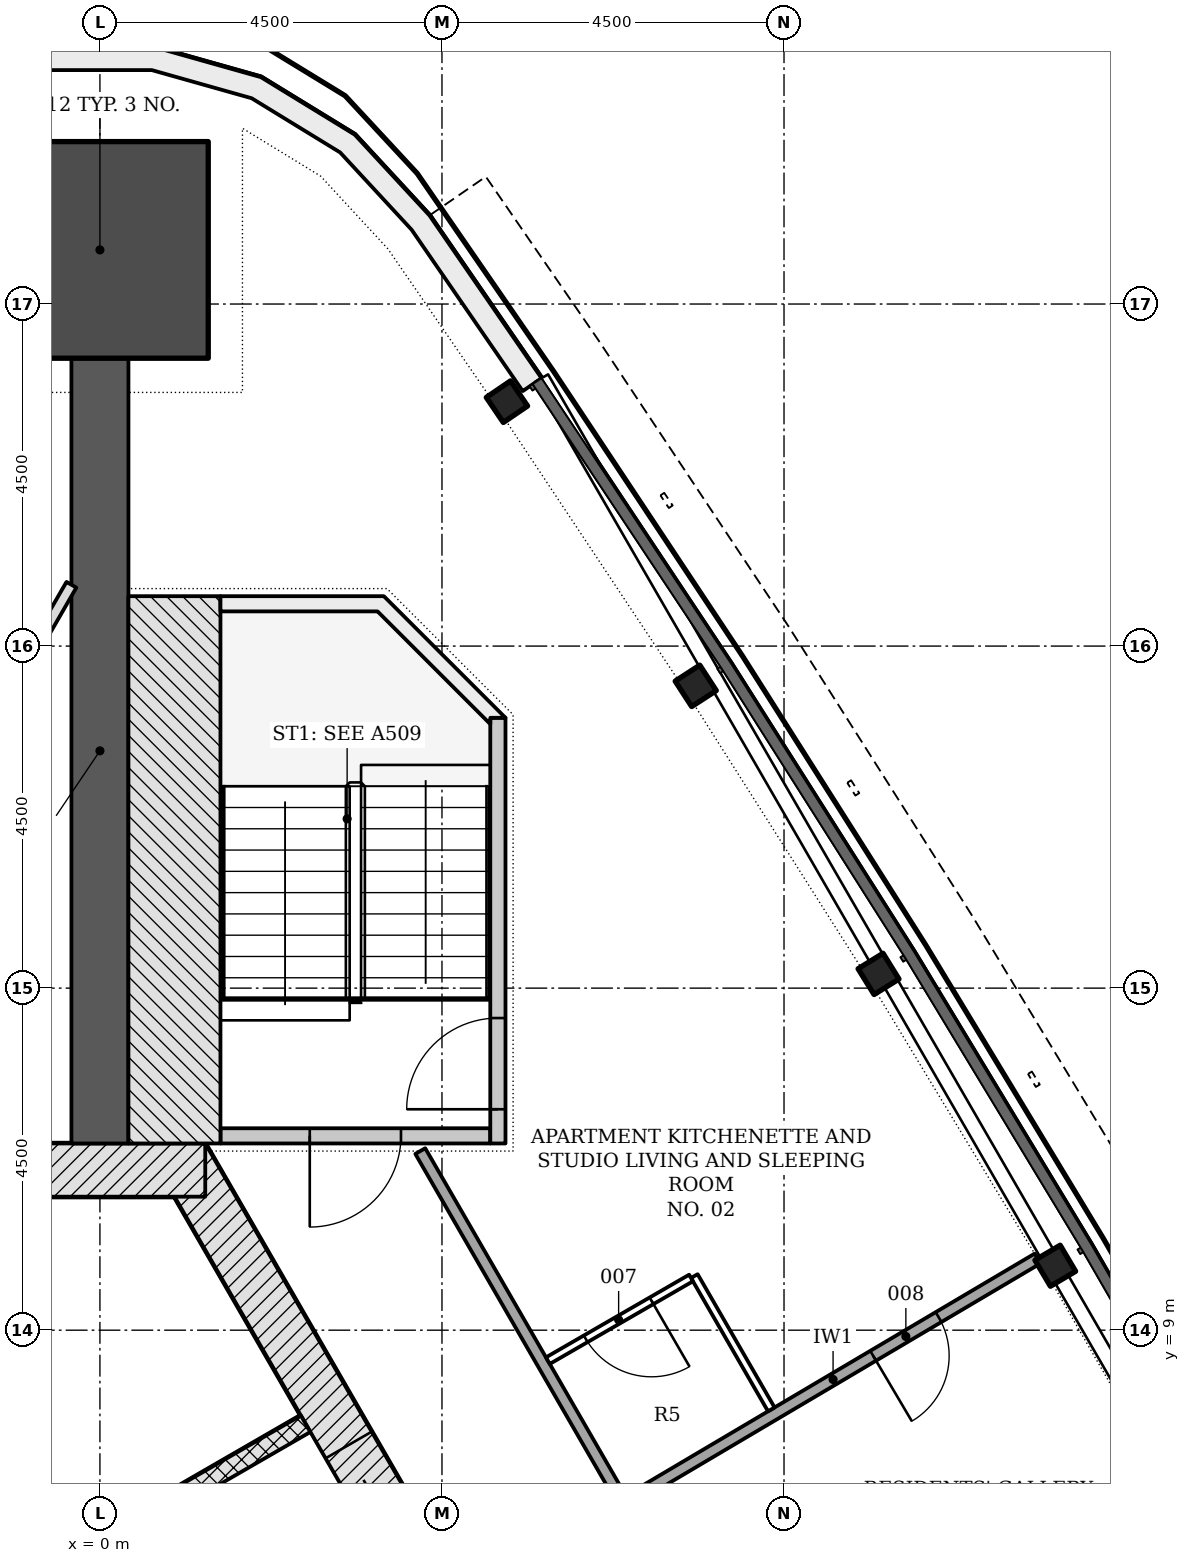
"""IFC4 building model, lengths in metres.
Left out: names, types, materials, properties, quantities, classifications, styles, units other than length and angle.
Written with IfcOpenShell. Run it as: python <this file> out.ifc"""

import sys

from ifc_helpers import new_model, si_unit, direction, frame, frame_2d, origin, origin_2d, place, context, subcontext, project, spatial, polyline, rectangle, i_section, outline, extrude, element, fill, save


model = new_model("IFC4")
c1 = context("Model", 3, precision=1e-05, world=origin(), true_north=direction((0.0, 1.0)))
c2 = subcontext(c1, "Body", "Model", "MODEL_VIEW")
j1 = project(units=[si_unit("LENGTHUNIT", "METRE"), si_unit("PLANEANGLEUNIT", "RADIAN")], contexts=[c1])
p1 = place(None, origin())
s1 = spatial("IfcSite", under=j1, at=p1, CompositionType="ELEMENT")
p2 = place(p1, origin())
s2 = spatial("IfcBuilding", under=s1, at=p2, CompositionType="ELEMENT")
p3 = place(p2, frame((0.0, 0.0, 158.1)))
s3 = spatial("IfcBuildingStorey", under=s2, at=p3, CompositionType="ELEMENT", Elevation=158.1)
p4 = place(p3, frame((10.311, -4.703, -0.2), z_axis=(0.0, 0.0, 1.0), x_axis=(-0.500001446645, 0.866024568562, 0.0)))
e1 = element("IfcWall", 1, at=p4, inside=s3, PredefinedType="SHEAR", context=c2, shape_type="SweptSolid", body=[
    extrude(rectangle(XDim=18.458, YDim=0.7, at=frame_2d((9.229, 0.0))), origin(), (0.0, 0.0, 1.0), 3.6),
])
p5 = place(p4, frame((4.379, 0.0, 0.2)))
e2 = element("IfcOpeningElement", 2, at=p5, cuts=e1, PredefinedType="OPENING", context=c2, shape_type="SweptSolid", body=[
    extrude(rectangle(XDim=1.1, YDim=2.1, at=frame_2d((0.55, 1.05))), frame((0.0, 0.36, 0.0), z_axis=(0.0, -1.0, 0.0), x_axis=(1.0, 0.0, 0.0)), (0.0, 0.0, 1.0), 0.72),
])
p6 = place(p4, frame((6.529, 0.0, 0.2)))
e3 = element("IfcOpeningElement", 3, at=p6, cuts=e1, PredefinedType="OPENING", context=c2, shape_type="SweptSolid", body=[
    extrude(rectangle(XDim=1.1, YDim=2.1, at=frame_2d((0.55, 1.05))), frame((0.0, 0.36, 0.0), z_axis=(0.0, -1.0, 0.0), x_axis=(1.0, 0.0, 0.0)), (0.0, 0.0, 1.0), 0.72),
])
p7 = place(p4, frame((8.679, 0.0, 0.2)))
e4 = element("IfcOpeningElement", 4, at=p7, cuts=e1, PredefinedType="OPENING", context=c2, shape_type="SweptSolid", body=[
    extrude(rectangle(XDim=1.1, YDim=2.1, at=frame_2d((0.55, 1.05))), frame((0.0, 0.36, 0.0), z_axis=(0.0, -1.0, 0.0), x_axis=(1.0, 0.0, 0.0)), (0.0, 0.0, 1.0), 0.72),
])
p8 = place(p4, frame((10.829, 0.0, 0.2)))
e5 = element("IfcOpeningElement", 5, at=p8, cuts=e1, PredefinedType="OPENING", context=c2, shape_type="SweptSolid", body=[
    extrude(rectangle(XDim=1.1, YDim=2.1, at=frame_2d((0.55, 1.05))), frame((0.0, 0.36, 0.0), z_axis=(0.0, -1.0, 0.0), x_axis=(1.0, 0.0, 0.0)), (0.0, 0.0, 1.0), 0.72),
])
p9 = place(p4, frame((12.979, 0.0, 0.2)))
e6 = element("IfcOpeningElement", 6, at=p9, cuts=e1, PredefinedType="OPENING", context=c2, shape_type="SweptSolid", body=[
    extrude(rectangle(XDim=1.1, YDim=2.1, at=frame_2d((0.55, 1.05))), frame((0.0, 0.36, 0.0), z_axis=(0.0, -1.0, 0.0), x_axis=(1.0, 0.0, 0.0)), (0.0, 0.0, 1.0), 0.72),
])
p10 = place(p3, frame((1.386, 11.106, -0.2), z_axis=(0.0, 0.0, 1.0), x_axis=(-1.0, 0.0, 0.0)))
e7 = element("IfcWall", 7, at=p10, inside=s3, PredefinedType="SHEAR", context=c2, shape_type="SweptSolid", body=[
    extrude(rectangle(XDim=2.771, YDim=0.7, at=frame_2d((1.386, 0.0))), origin(), (0.0, 0.0, 1.0), 3.6),
])
p11 = place(p3, frame((0.0, 11.456, -0.2), z_axis=(0.0, 0.0, 1.0), x_axis=(0.0, 1.0, 0.0)))
e8 = element("IfcWall", 8, at=p11, inside=s3, PredefinedType="SHEAR", context=c2, shape_type="SweptSolid", body=[
    extrude(rectangle(XDim=10.331, YDim=0.75, at=frame_2d((5.166, 0.0))), origin(), (0.0, 0.0, 1.0), 3.6),
])
p12 = place(p3, frame((0.0, 23.212, -0.2), z_axis=(0.0, 0.0, 1.0), x_axis=(0.0, 1.0, 0.0)))
e9 = element("IfcColumn", 9, at=p12, inside=s3, PredefinedType="COLUMN", context=c2, shape_type="SweptSolid", body=[
    extrude(rectangle(XDim=2.85, YDim=2.85, at=origin_2d()), origin(), (0.0, 0.0, 1.0), 3.6),
])
for number, where, z_axis, x_axis in (
    (10, (12.569, 9.848, -0.2), (0.0, 0.0, 1.0), (-0.509, 0.861, 0.0)),
    (11, (10.244, 13.687, -0.2), (0.0, 0.0, 1.0), (-0.527, 0.85, 0.0)),
    (12, (7.839, 17.477, -0.2), (0.0, 0.0, 1.0), (-0.545, 0.839, 0.0)),
    (13, (5.355, 21.215, -0.2), (0.0, 0.0, 1.0), (-0.562, 0.827, 0.0)),
):
    element("IfcColumn", number, at=place(p3, frame(where, z_axis=z_axis, x_axis=x_axis)), inside=s3, PredefinedType="COLUMN", context=c2, shape_type="SweptSolid", body=[
        extrude(i_section(OverallWidth=0.399, OverallDepth=0.386, WebThickness=0.021, FlangeThickness=0.033, FilletRadius=0.015, at=origin_2d()), origin(), (0.0, 0.0, 1.0), 3.6),
    ])
p13 = place(p3, origin())
e14 = element("IfcWall", 14, at=p13, inside=s3, PredefinedType="NOTDEFINED", context=c2, shape_type="SweptSolid", body=[
    extrude(outline(polyline([(5.81, 21.524), (4.336, 23.665), (3.353, 24.728), (2.118, 25.485), (0.724, 25.877), (-0.724, 25.877), (-2.118, 25.485), (-3.353, 24.728), (-4.336, 23.665), (-5.81, 21.524), (-5.562, 21.354), (-4.101, 23.477), (-3.16, 24.494), (-1.996, 25.207), (-0.683, 25.578), (0.683, 25.578), (1.996, 25.207), (3.16, 24.494), (4.101, 23.477), (5.562, 21.354), (5.81, 21.524)])), origin(), (0.0, 0.0, 1.0), 3.3),
])
p14 = place(p3, frame((2.706, 7.769, -0.2), z_axis=(0.0, 0.0, 1.0), x_axis=(-0.866022959057, -0.500004234368, 0.0)))
e15 = element("IfcWall", 15, at=p14, inside=s3, PredefinedType="PARTITIONING", context=c2, shape_type="SweptSolid", body=[
    extrude(rectangle(XDim=2.5, YDim=0.25, at=frame_2d((1.25, 0.0))), origin(), (0.0, 0.0, 1.0), 3.6),
])
p15 = place(p3, frame((5.135, 11.556, -0.2), z_axis=(0.0, 0.0, 1.0), x_axis=(-1.0, 0.0, 0.0)))
e16 = element("IfcWall", 16, at=p15, inside=s3, PredefinedType="SHEAR", context=c2, shape_type="SweptSolid", body=[
    extrude(rectangle(XDim=3.55, YDim=0.2, at=frame_2d((1.775, 0.0))), origin(), (0.0, 0.0, 1.0), 3.6),
])
p16 = place(p15, frame((1.175, 0.0, 0.2)))
e17 = element("IfcOpeningElement", 17, at=p16, cuts=e16, PredefinedType="OPENING", context=c2, shape_type="SweptSolid", body=[
    extrude(rectangle(XDim=1.2, YDim=2.1, at=frame_2d((0.6, 1.05))), frame((0.0, 0.11, 0.0), z_axis=(0.0, -1.0, 0.0), x_axis=(1.0, 0.0, 0.0)), (0.0, 0.0, 1.0), 0.22),
])
p17 = place(p3, frame((5.236, 11.456, -0.2), z_axis=(0.0, 0.0, 1.0), x_axis=(0.0, 1.0, 0.0)))
e18 = element("IfcWall", 18, at=p17, inside=s3, PredefinedType="SHEAR", context=c2, shape_type="SweptSolid", body=[
    extrude(rectangle(XDim=5.6, YDim=0.2, at=frame_2d((2.8, 0.0))), origin(), (0.0, 0.0, 1.0), 3.6),
])
p18 = place(p17, frame((0.45, 0.0, 0.2)))
e19 = element("IfcOpeningElement", 19, at=p18, cuts=e18, PredefinedType="OPENING", context=c2, shape_type="SweptSolid", body=[
    extrude(rectangle(XDim=1.2, YDim=2.1, at=frame_2d((0.6, 1.05))), frame((0.0, 0.11, 0.0), z_axis=(0.0, -1.0, 0.0), x_axis=(1.0, 0.0, 0.0)), (0.0, 0.0, 1.0), 0.22),
])
p19 = place(p3, frame((0.98, 11.456, -0.2), z_axis=(0.0, 0.0, 1.0), x_axis=(0.0, 1.0, 0.0)))
e20 = element("IfcWall", 20, at=p19, inside=s3, PredefinedType="SHEAR", context=c2, shape_type="SweptSolid", body=[
    extrude(rectangle(XDim=7.2, YDim=1.211, at=frame_2d((3.6, 0.0))), origin(), (0.0, 0.0, 1.0), 3.6),
])
p20 = place(p3, frame((0.0, 0.0, -0.2)))
e21 = element("IfcWall", 21, at=p20, inside=s3, PredefinedType="SHEAR", context=c2, shape_type="SweptSolid", body=[
    extrude(outline(polyline([(5.336, 17.056), (3.736, 18.656), (1.586, 18.656), (1.586, 18.456), (3.653, 18.456), (5.135, 16.974), (5.135, 17.056), (5.135, 17.056), (5.135, 17.056), (5.135, 17.056), (5.135, 17.056), (5.135, 17.056), (5.135, 17.056), (5.135, 17.056), (5.135, 17.056), (5.135, 17.056), (5.135, 17.056), (5.135, 17.056), (5.135, 17.056), (5.135, 17.056), (5.135, 17.056), (5.135, 17.056), (5.135, 17.056), (5.336, 17.056)])), origin(), (0.0, 0.0, 1.0), 3.6),
])
p21 = place(p3, frame((6.89, 6.722, 0.0), z_axis=(0.0, 0.0, 1.0), x_axis=(-0.500025224267, 0.866010840057, 0.0)))
e22 = element("IfcWall", 22, at=p21, inside=s3, PredefinedType="PARTITIONING", context=c2, shape_type="SweptSolid", body=[
    extrude(rectangle(XDim=5.351, YDim=0.15, at=frame_2d((2.676, 0.0))), origin(), (0.0, 0.0, 1.0), 2.847),
])
p22 = place(p3, frame((12.336, 9.943, 0.0), z_axis=(0.0, 0.0, 1.0), x_axis=(-0.860742216303, -0.509041095663, 0.0)))
e23 = element("IfcWall", 23, at=p22, inside=s3, PredefinedType="PARTITIONING", context=c2, shape_type="SweptSolid", body=[
    extrude(rectangle(XDim=6.252, YDim=0.15, at=frame_2d((3.126, 0.0))), origin(), (0.0, 0.0, 1.0), 3.4),
])
p23 = place(p22, frame((1.513, 0.0, 0.0)))
e24 = element("IfcOpeningElement", 24, at=p23, cuts=e23, PredefinedType="OPENING", context=c2, shape_type="SweptSolid", body=[
    extrude(rectangle(XDim=1.0, YDim=2.1, at=frame_2d((0.5, 1.05))), frame((0.0, 0.085, 0.0), z_axis=(0.0, -1.0, 0.0), x_axis=(1.0, 0.0, 0.0)), (0.0, 0.0, 1.0), 0.17),
])
p24 = place(p3, frame((8.833, 7.958, 0.0), z_axis=(0.0, 0.0, 1.0), x_axis=(-0.499938124251, 0.866061124818, 0.0)))
e25 = element("IfcWall", 25, at=p24, inside=s3, PredefinedType="PARTITIONING", context=c2, shape_type="SweptSolid", body=[
    extrude(rectangle(XDim=2.025, YDim=0.1, at=frame_2d((1.013, 0.0))), origin(), (0.0, 0.0, 1.0), 3.4),
])
p25 = place(p3, frame((7.777, 9.687, 0.0), z_axis=(0.0, 0.0, 1.0), x_axis=(-0.866037911478, -0.499978335414, 0.0)))
e26 = element("IfcWall", 26, at=p25, inside=s3, PredefinedType="PARTITIONING", context=c2, shape_type="SweptSolid", body=[
    extrude(rectangle(XDim=2.175, YDim=0.1, at=frame_2d((1.087, 0.0))), origin(), (0.0, 0.0, 1.0), 3.4),
])
p26 = place(p25, frame((0.6, 0.0, 0.0)))
e27 = element("IfcOpeningElement", 27, at=p26, cuts=e26, PredefinedType="OPENING", context=c2, shape_type="SweptSolid", body=[
    extrude(rectangle(XDim=1.0, YDim=2.1, at=frame_2d((0.5, 1.05))), frame((0.0, 0.06, 0.0), z_axis=(0.0, -1.0, 0.0), x_axis=(1.0, 0.0, 0.0)), (0.0, 0.0, 1.0), 0.12),
])
p27 = place(p3, frame((-0.375, 18.807, 0.0), z_axis=(0.0, 0.0, 1.0), x_axis=(-0.499989180974, -0.866031650062, 0.0)))
e28 = element("IfcWall", 28, at=p27, inside=s3, PredefinedType="PARTITIONING", context=c2, shape_type="SweptSolid", body=[
    extrude(rectangle(XDim=5.388, YDim=0.15, at=frame_2d((2.694, 0.0))), origin(), (0.0, 0.0, 1.0), 2.847),
])
p28 = place(p9, origin())
e29 = element("IfcDoor", 29, at=p28, inside=s3, OperationType="DOUBLE_DOOR_SLIDING", PredefinedType="DOOR", context=c2, shape_type="SweptSolid", body=[
    extrude(rectangle(XDim=1.1, YDim=2.1, at=frame_2d((0.55, 1.05))), frame((0.0, 0.025, 0.0), z_axis=(0.0, -1.0, 0.0), x_axis=(1.0, 0.0, 0.0)), (0.0, 0.0, 1.0), 0.05),
])
fill(e6, e29)
p29 = place(p16, origin())
e30 = element("IfcDoor", 30, at=p29, inside=s3, OperationType="SINGLE_SWING_RIGHT", PredefinedType="DOOR", context=c2, shape_type="SweptSolid", body=[
    extrude(rectangle(XDim=1.2, YDim=2.1, at=frame_2d((0.6, 1.05))), frame((0.0, 0.025, 0.0), z_axis=(0.0, -1.0, 0.0), x_axis=(1.0, 0.0, 0.0)), (0.0, 0.0, 1.0), 0.05),
])
fill(e17, e30)
p30 = place(p18, origin())
e31 = element("IfcDoor", 31, at=p30, inside=s3, OperationType="SINGLE_SWING_LEFT", PredefinedType="DOOR", context=c2, shape_type="SweptSolid", body=[
    extrude(rectangle(XDim=1.2, YDim=2.1, at=frame_2d((0.6, 1.05))), frame((0.0, 0.025, 0.0), z_axis=(0.0, -1.0, 0.0), x_axis=(1.0, 0.0, 0.0)), (0.0, 0.0, 1.0), 0.05),
])
fill(e19, e31)
p31 = place(p26, origin())
e32 = element("IfcDoor", 32, at=p31, inside=s3, OperationType="SINGLE_SWING_LEFT", PredefinedType="DOOR", context=c2, shape_type="SweptSolid", body=[
    extrude(rectangle(XDim=1.0, YDim=2.1, at=frame_2d((0.5, 1.05))), frame((0.0, 0.025, 0.0), z_axis=(0.0, -1.0, 0.0), x_axis=(1.0, 0.0, 0.0)), (0.0, 0.0, 1.0), 0.05),
])
fill(e27, e32)
p32 = place(p23, origin())
e33 = element("IfcDoor", 33, at=p32, inside=s3, OperationType="SINGLE_SWING_RIGHT", PredefinedType="DOOR", context=c2, shape_type="SweptSolid", body=[
    extrude(rectangle(XDim=1.0, YDim=2.1, at=frame_2d((0.5, 1.05))), frame((0.0, 0.025, 0.0), z_axis=(0.0, -1.0, 0.0), x_axis=(1.0, 0.0, 0.0)), (0.0, 0.0, 1.0), 0.05),
])
fill(e24, e33)
save(model, sys.argv[1])
